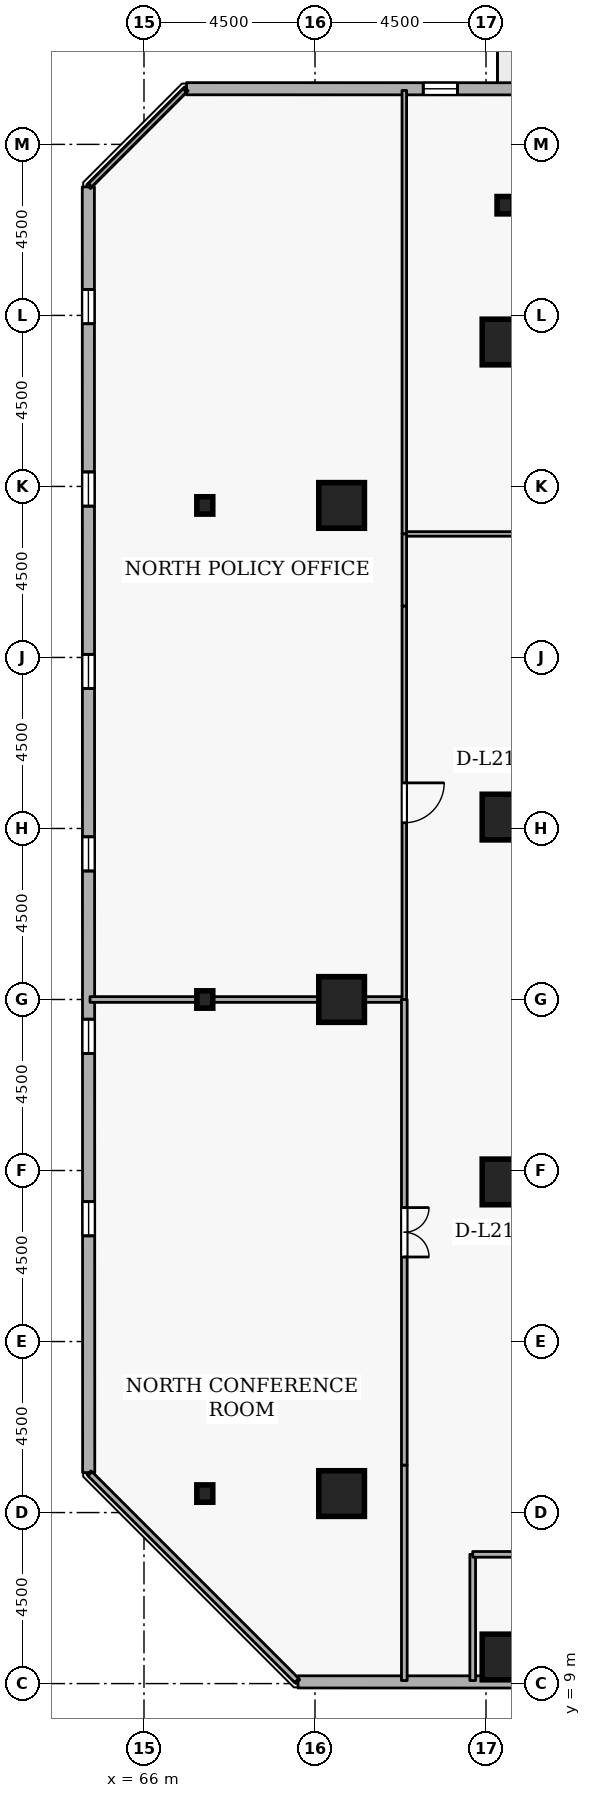
"""IFC4 building model, lengths in metres.
Left out: names, types, materials, properties, quantities, classifications, styles, units other than length and angle.
Written with IfcOpenShell. Run it as: python <this file> out.ifc"""

import sys

from ifc_helpers import new_model, si_unit, direction, frame, frame_2d, origin, origin_2d, place, context, subcontext, project, spatial, rectangle, i_section, extrude, element, fill, save


model = new_model("IFC4")
c1 = context("Model", 3, precision=1e-05, world=origin(), true_north=direction((0.0, 1.0)))
c2 = subcontext(c1, "Body", "Model", "MODEL_VIEW")
j1 = project(units=[si_unit("LENGTHUNIT", "METRE"), si_unit("PLANEANGLEUNIT", "RADIAN")], contexts=[c1])
p1 = place(None, origin())
s1 = spatial("IfcSite", under=j1, at=p1, CompositionType="ELEMENT")
p2 = place(p1, origin())
s2 = spatial("IfcBuilding", under=s1, at=p2, CompositionType="ELEMENT")
p3 = place(p2, frame((0.0, 0.0, 83.7)))
s3 = spatial("IfcBuildingStorey", under=s2, at=p3, CompositionType="ELEMENT", Elevation=83.7)
for number, where, z_axis, x_axis in (
    (1, (75.5, 44.3, 0.0), (0.0, 0.0, 1.0), (1.0, 0.0, 0.0)),
    (2, (71.2, 14.0, 0.0), (0.0, 0.0, 1.0), (1.0, 0.0, 0.0)),
    (3, (71.2, 27.0, 0.0), (0.0, 0.0, 1.0), (1.0, 0.0, 0.0)),
    (4, (71.2, 40.0, 0.0), (0.0, 0.0, 1.0), (1.0, 0.0, 0.0)),
    (5, (75.5, 9.7, 0.0), (0.0, 0.0, 1.0), (1.0, 0.0, 0.0)),
    (6, (75.5, 22.2, 0.0), (0.0, 0.0, 1.0), (1.0, 0.0, 0.0)),
    (7, (75.5, 31.8, 0.0), (0.0, 0.0, 1.0), (1.0, 0.0, 0.0)),
):
    element("IfcColumn", number, at=place(p3, frame(where, z_axis=z_axis, x_axis=x_axis)), inside=s3, PredefinedType="COLUMN", context=c2, shape_type="SweptSolid", body=[
        extrude(rectangle(XDim=1.2, YDim=1.2, at=origin_2d()), origin(), (0.0, 0.0, 1.0), 3.6),
    ])
for number, where, z_axis, x_axis in (
    (8, (75.5, 47.9, 0.0), (0.0, 0.0, 1.0), (1.0, 0.0, 0.0)),
    (9, (67.6, 14.0, 0.0), (0.0, 0.0, 1.0), (1.0, 0.0, 0.0)),
    (10, (67.6, 27.0, 0.0), (0.0, 0.0, 1.0), (1.0, 0.0, 0.0)),
    (11, (67.6, 40.0, 0.0), (0.0, 0.0, 1.0), (1.0, 0.0, 0.0)),
):
    element("IfcColumn", number, at=place(p3, frame(where, z_axis=z_axis, x_axis=x_axis)), inside=s3, PredefinedType="COLUMN", context=c2, shape_type="SweptSolid", body=[
        extrude(i_section(OverallWidth=0.418, OverallDepth=0.456, WebThickness=0.042, FlangeThickness=0.067, FilletRadius=0.015, at=origin_2d()), origin(), (0.0, 0.0, 1.0), 3.6),
    ])
p4 = place(p3, frame((70.052, 9.045, 0.0), z_axis=(0.0, 0.0, 1.0), x_axis=(0.999999960392, -0.000281454314, 0.0)))
e12 = element("IfcWall", 12, at=p4, inside=s3, PredefinedType="STANDARD", context=c2, shape_type="SweptSolid", body=[
    extrude(rectangle(XDim=33.83, YDim=0.32, at=frame_2d((16.915, 0.0))), origin(), (0.0, 0.0, 1.0), 2.7),
])
p5 = place(p4, frame((7.5, 0.0, 0.72)))
e13 = element("IfcOpeningElement", 13, at=p5, cuts=e12, PredefinedType="OPENING", context=c2, shape_type="SweptSolid", body=[
    extrude(rectangle(XDim=0.9, YDim=1.75, at=frame_2d((0.45, 0.875))), frame((0.0, 0.17, 0.0), z_axis=(0.0, -1.0, 0.0), x_axis=(1.0, 0.0, 0.0)), (0.0, 0.0, 1.0), 0.34),
])
p6 = place(p4, frame((12.3, 0.0, 0.72)))
e14 = element("IfcOpeningElement", 14, at=p6, cuts=e12, PredefinedType="OPENING", context=c2, shape_type="SweptSolid", body=[
    extrude(rectangle(XDim=0.9, YDim=1.75, at=frame_2d((0.45, 0.875))), frame((0.0, 0.17, 0.0), z_axis=(0.0, -1.0, 0.0), x_axis=(1.0, 0.0, 0.0)), (0.0, 0.0, 1.0), 0.34),
])
p7 = place(p4, frame((21.9, 0.0, 0.72)))
e15 = element("IfcOpeningElement", 15, at=p7, cuts=e12, PredefinedType="OPENING", context=c2, shape_type="SweptSolid", body=[
    extrude(rectangle(XDim=0.9, YDim=1.75, at=frame_2d((0.45, 0.875))), frame((0.0, 0.17, 0.0), z_axis=(0.0, -1.0, 0.0), x_axis=(1.0, 0.0, 0.0)), (0.0, 0.0, 1.0), 0.34),
])
p8 = place(p4, frame((26.7, 0.0, 0.72)))
e16 = element("IfcOpeningElement", 16, at=p8, cuts=e12, PredefinedType="OPENING", context=c2, shape_type="SweptSolid", body=[
    extrude(rectangle(XDim=0.9, YDim=1.75, at=frame_2d((0.45, 0.875))), frame((0.0, 0.17, 0.0), z_axis=(0.0, -1.0, 0.0), x_axis=(1.0, 0.0, 0.0)), (0.0, 0.0, 1.0), 0.34),
])
p9 = place(p3, frame((100.948, 50.955, 0.0), z_axis=(0.0, 0.0, 1.0), x_axis=(-0.999999960392, 0.000281454314, 0.0)))
e17 = element("IfcWall", 17, at=p9, inside=s3, PredefinedType="STANDARD", context=c2, shape_type="SweptSolid", body=[
    extrude(rectangle(XDim=33.83, YDim=0.32, at=frame_2d((16.915, 0.0))), origin(), (0.0, 0.0, 1.0), 2.7),
])
p10 = place(p9, frame((18.715, 0.0, 0.0)))
e18 = element("IfcOpeningElement", 18, at=p10, cuts=e17, PredefinedType="OPENING", context=c2, shape_type="SweptSolid", body=[
    extrude(rectangle(XDim=1.0, YDim=2.08, at=frame_2d((0.5, 1.04))), frame((0.0, 0.17, 0.0), z_axis=(0.0, -1.0, 0.0), x_axis=(1.0, 0.0, 0.0)), (0.0, 0.0, 1.0), 0.34),
])
p11 = place(p9, frame((2.7, 0.0, 0.72)))
e19 = element("IfcOpeningElement", 19, at=p11, cuts=e17, PredefinedType="OPENING", context=c2, shape_type="SweptSolid", body=[
    extrude(rectangle(XDim=0.9, YDim=1.75, at=frame_2d((0.45, 0.875))), frame((0.0, 0.17, 0.0), z_axis=(0.0, -1.0, 0.0), x_axis=(1.0, 0.0, 0.0)), (0.0, 0.0, 1.0), 0.34),
])
p12 = place(p9, frame((7.5, 0.0, 0.72)))
e20 = element("IfcOpeningElement", 20, at=p12, cuts=e17, PredefinedType="OPENING", context=c2, shape_type="SweptSolid", body=[
    extrude(rectangle(XDim=0.9, YDim=1.75, at=frame_2d((0.45, 0.875))), frame((0.0, 0.17, 0.0), z_axis=(0.0, -1.0, 0.0), x_axis=(1.0, 0.0, 0.0)), (0.0, 0.0, 1.0), 0.34),
])
p13 = place(p9, frame((21.9, 0.0, 0.72)))
e21 = element("IfcOpeningElement", 21, at=p13, cuts=e17, PredefinedType="OPENING", context=c2, shape_type="SweptSolid", body=[
    extrude(rectangle(XDim=0.9, YDim=1.75, at=frame_2d((0.45, 0.875))), frame((0.0, 0.17, 0.0), z_axis=(0.0, -1.0, 0.0), x_axis=(1.0, 0.0, 0.0)), (0.0, 0.0, 1.0), 0.34),
])
p14 = place(p9, frame((26.7, 0.0, 0.72)))
e22 = element("IfcOpeningElement", 22, at=p14, cuts=e17, PredefinedType="OPENING", context=c2, shape_type="SweptSolid", body=[
    extrude(rectangle(XDim=0.9, YDim=1.75, at=frame_2d((0.45, 0.875))), frame((0.0, 0.17, 0.0), z_axis=(0.0, -1.0, 0.0), x_axis=(1.0, 0.0, 0.0)), (0.0, 0.0, 1.0), 0.34),
])
p15 = place(p3, frame((64.535, 48.381, 0.0), z_axis=(0.0, 0.0, 1.0), x_axis=(0.000281454314, -0.999999960392, 0.0)))
e23 = element("IfcWall", 23, at=p15, inside=s3, PredefinedType="STANDARD", context=c2, shape_type="SweptSolid", body=[
    extrude(rectangle(XDim=33.83, YDim=0.32, at=frame_2d((16.915, 0.0))), origin(), (0.0, 0.0, 1.0), 2.7),
])
p16 = place(p15, frame((2.7, 0.0, 0.72)))
e24 = element("IfcOpeningElement", 24, at=p16, cuts=e23, PredefinedType="OPENING", context=c2, shape_type="SweptSolid", body=[
    extrude(rectangle(XDim=0.9, YDim=1.75, at=frame_2d((0.45, 0.875))), frame((0.0, 0.17, 0.0), z_axis=(0.0, -1.0, 0.0), x_axis=(1.0, 0.0, 0.0)), (0.0, 0.0, 1.0), 0.34),
])
p17 = place(p15, frame((7.5, 0.0, 0.72)))
e25 = element("IfcOpeningElement", 25, at=p17, cuts=e23, PredefinedType="OPENING", context=c2, shape_type="SweptSolid", body=[
    extrude(rectangle(XDim=0.9, YDim=1.75, at=frame_2d((0.45, 0.875))), frame((0.0, 0.17, 0.0), z_axis=(0.0, -1.0, 0.0), x_axis=(1.0, 0.0, 0.0)), (0.0, 0.0, 1.0), 0.34),
])
p18 = place(p15, frame((12.3, 0.0, 0.72)))
e26 = element("IfcOpeningElement", 26, at=p18, cuts=e23, PredefinedType="OPENING", context=c2, shape_type="SweptSolid", body=[
    extrude(rectangle(XDim=0.9, YDim=1.75, at=frame_2d((0.45, 0.875))), frame((0.0, 0.17, 0.0), z_axis=(0.0, -1.0, 0.0), x_axis=(1.0, 0.0, 0.0)), (0.0, 0.0, 1.0), 0.34),
])
p19 = place(p15, frame((17.1, 0.0, 0.72)))
e27 = element("IfcOpeningElement", 27, at=p19, cuts=e23, PredefinedType="OPENING", context=c2, shape_type="SweptSolid", body=[
    extrude(rectangle(XDim=0.9, YDim=1.75, at=frame_2d((0.45, 0.875))), frame((0.0, 0.17, 0.0), z_axis=(0.0, -1.0, 0.0), x_axis=(1.0, 0.0, 0.0)), (0.0, 0.0, 1.0), 0.34),
])
p20 = place(p15, frame((21.9, 0.0, 0.72)))
e28 = element("IfcOpeningElement", 28, at=p20, cuts=e23, PredefinedType="OPENING", context=c2, shape_type="SweptSolid", body=[
    extrude(rectangle(XDim=0.9, YDim=1.75, at=frame_2d((0.45, 0.875))), frame((0.0, 0.17, 0.0), z_axis=(0.0, -1.0, 0.0), x_axis=(1.0, 0.0, 0.0)), (0.0, 0.0, 1.0), 0.34),
])
p21 = place(p15, frame((26.7, 0.0, 0.72)))
e29 = element("IfcOpeningElement", 29, at=p21, cuts=e23, PredefinedType="OPENING", context=c2, shape_type="SweptSolid", body=[
    extrude(rectangle(XDim=0.9, YDim=1.75, at=frame_2d((0.45, 0.875))), frame((0.0, 0.17, 0.0), z_axis=(0.0, -1.0, 0.0), x_axis=(1.0, 0.0, 0.0)), (0.0, 0.0, 1.0), 0.34),
])
p22 = place(p3, frame((74.65, 9.08, 0.0), z_axis=(0.0, 0.0, 1.0), x_axis=(0.0, 1.0, 0.0)))
e30 = element("IfcWall", 30, at=p22, inside=s3, PredefinedType="PARTITIONING", context=c2, shape_type="SweptSolid", body=[
    extrude(rectangle(XDim=3.32, YDim=0.15, at=frame_2d((1.66, 0.0))), origin(), (0.0, 0.0, 1.0), 3.34),
])
p23 = place(p3, frame((74.65, 12.4, 0.0), z_axis=(0.0, 0.0, 1.0), x_axis=(1.0, 0.0, 0.0)))
e31 = element("IfcWall", 31, at=p23, inside=s3, PredefinedType="PARTITIONING", context=c2, shape_type="SweptSolid", body=[
    extrude(rectangle(XDim=4.802, YDim=0.15, at=frame_2d((2.401, 0.0))), origin(), (0.0, 0.0, 1.0), 3.34),
])
p24 = place(p3, frame((82.2, 39.25, 0.0), z_axis=(0.0, 0.0, 1.0), x_axis=(-1.0, 0.0, 0.0)))
e32 = element("IfcWall", 32, at=p24, inside=s3, PredefinedType="PARTITIONING", context=c2, shape_type="SweptSolid", body=[
    extrude(rectangle(XDim=9.35, YDim=0.12, at=frame_2d((4.675, 0.0))), origin(), (0.0, 0.0, 1.0), 3.34),
])
p25 = place(p24, frame((4.15, 0.0, 0.0)))
e33 = element("IfcOpeningElement", 33, at=p25, cuts=e32, PredefinedType="OPENING", context=c2, shape_type="SweptSolid", body=[
    extrude(rectangle(XDim=1.05, YDim=2.1, at=frame_2d((0.525, 1.05))), frame((0.0, 0.07, 0.0), z_axis=(0.0, -1.0, 0.0), x_axis=(1.0, 0.0, 0.0)), (0.0, 0.0, 1.0), 0.14),
])
p26 = place(p3, frame((72.85, 39.25, 0.0), z_axis=(0.0, 0.0, 1.0), x_axis=(0.0, 1.0, 0.0)))
e34 = element("IfcWall", 34, at=p26, inside=s3, PredefinedType="PARTITIONING", context=c2, shape_type="SweptSolid", body=[
    extrude(rectangle(XDim=11.67, YDim=0.12, at=frame_2d((5.835, 0.0))), origin(), (0.0, 0.0, 1.0), 3.34),
])
p27 = place(p3, frame((72.85, 14.75, 0.0), z_axis=(0.0, 0.0, 1.0), x_axis=(0.0, -1.0, 0.0)))
e35 = element("IfcWall", 35, at=p27, inside=s3, PredefinedType="PARTITIONING", context=c2, shape_type="SweptSolid", body=[
    extrude(rectangle(XDim=5.67, YDim=0.15, at=frame_2d((2.835, 0.0))), origin(), (0.0, 0.0, 1.0), 3.34),
])
p28 = place(p3, frame((70.02, 9.08, 0.0), z_axis=(0.0, 0.0, 1.0), x_axis=(-0.707106781187, 0.707106781187, 0.0)))
e36 = element("IfcWall", 36, at=p28, inside=s3, PredefinedType="PARTITIONING", context=c2, shape_type="SweptSolid", body=[
    extrude(rectangle(XDim=7.693, YDim=0.15, at=frame_2d((3.846, 0.0))), origin(), (0.0, 0.0, 1.0), 3.34),
])
p29 = place(p3, frame((64.58, 27.0, 0.0), z_axis=(0.0, 0.0, 1.0), x_axis=(1.0, 0.0, 0.0)))
e37 = element("IfcWall", 37, at=p29, inside=s3, PredefinedType="PARTITIONING", context=c2, shape_type="SweptSolid", body=[
    extrude(rectangle(XDim=8.27, YDim=0.15, at=frame_2d((4.135, 0.0))), origin(), (0.0, 0.0, 1.0), 2.882),
])
p30 = place(p3, frame((72.85, 27.0, 0.0), z_axis=(0.0, 0.0, 1.0), x_axis=(0.0, -1.0, 0.0)))
e38 = element("IfcWall", 38, at=p30, inside=s3, PredefinedType="PARTITIONING", context=c2, shape_type="SweptSolid", body=[
    extrude(rectangle(XDim=12.25, YDim=0.15, at=frame_2d((6.125, 0.0))), origin(), (0.0, 0.0, 1.0), 3.34),
])
p31 = place(p30, frame((5.475, 0.0, 0.0)))
e39 = element("IfcOpeningElement", 39, at=p31, cuts=e38, PredefinedType="OPENING", context=c2, shape_type="SweptSolid", body=[
    extrude(rectangle(XDim=1.3, YDim=2.12, at=frame_2d((0.65, 1.06))), frame((0.0, 0.085, 0.0), z_axis=(0.0, -1.0, 0.0), x_axis=(1.0, 0.0, 0.0)), (0.0, 0.0, 1.0), 0.17),
])
p32 = place(p3, frame((64.58, 48.425, 0.0), z_axis=(0.0, 0.0, 1.0), x_axis=(0.707106781187, 0.707106781187, 0.0)))
e40 = element("IfcWall", 40, at=p32, inside=s3, PredefinedType="PARTITIONING", context=c2, shape_type="SweptSolid", body=[
    extrude(rectangle(XDim=3.528, YDim=0.12, at=frame_2d((1.764, 0.0))), origin(), (0.0, 0.0, 1.0), 3.34),
])
p33 = place(p3, frame((72.85, 39.25, 0.0), z_axis=(0.0, 0.0, 1.0), x_axis=(0.0, -1.0, 0.0)))
e41 = element("IfcWall", 41, at=p33, inside=s3, PredefinedType="PARTITIONING", context=c2, shape_type="SweptSolid", body=[
    extrude(rectangle(XDim=1.9, YDim=0.12, at=frame_2d((0.95, 0.0))), origin(), (0.0, 0.0, 1.0), 2.895),
])
p34 = place(p3, frame((72.85, 37.35, 0.0), z_axis=(0.0, 0.0, 1.0), x_axis=(0.0, -1.0, 0.0)))
e42 = element("IfcWall", 42, at=p34, inside=s3, PredefinedType="PARTITIONING", context=c2, shape_type="SweptSolid", body=[
    extrude(rectangle(XDim=10.35, YDim=0.12, at=frame_2d((5.175, 0.0))), origin(), (0.0, 0.0, 1.0), 2.895),
])
p35 = place(p34, frame((4.65, 0.0, 0.0)))
e43 = element("IfcOpeningElement", 43, at=p35, cuts=e42, PredefinedType="OPENING", context=c2, shape_type="SweptSolid", body=[
    extrude(rectangle(XDim=1.05, YDim=2.1, at=frame_2d((0.525, 1.05))), frame((0.0, 0.07, 0.0), z_axis=(0.0, -1.0, 0.0), x_axis=(1.0, 0.0, 0.0)), (0.0, 0.0, 1.0), 0.14),
])
p36 = place(p14, origin())
e44 = element("IfcWindow", 44, at=p36, inside=s3, PartitioningType="SINGLE_PANEL", PredefinedType="WINDOW", context=c2, shape_type="SweptSolid", body=[
    extrude(rectangle(XDim=0.9, YDim=1.75, at=frame_2d((0.45, 0.875))), frame((0.0, 0.03, 0.0), z_axis=(0.0, -1.0, 0.0), x_axis=(1.0, 0.0, 0.0)), (0.0, 0.0, 1.0), 0.06),
])
fill(e22, e44)
p37 = place(p16, origin())
e45 = element("IfcWindow", 45, at=p37, inside=s3, PartitioningType="SINGLE_PANEL", PredefinedType="WINDOW", context=c2, shape_type="SweptSolid", body=[
    extrude(rectangle(XDim=0.9, YDim=1.75, at=frame_2d((0.45, 0.875))), frame((0.0, 0.03, 0.0), z_axis=(0.0, -1.0, 0.0), x_axis=(1.0, 0.0, 0.0)), (0.0, 0.0, 1.0), 0.06),
])
fill(e24, e45)
p38 = place(p17, origin())
e46 = element("IfcWindow", 46, at=p38, inside=s3, PartitioningType="SINGLE_PANEL", PredefinedType="WINDOW", context=c2, shape_type="SweptSolid", body=[
    extrude(rectangle(XDim=0.9, YDim=1.75, at=frame_2d((0.45, 0.875))), frame((0.0, 0.03, 0.0), z_axis=(0.0, -1.0, 0.0), x_axis=(1.0, 0.0, 0.0)), (0.0, 0.0, 1.0), 0.06),
])
fill(e25, e46)
p39 = place(p18, origin())
e47 = element("IfcWindow", 47, at=p39, inside=s3, PartitioningType="SINGLE_PANEL", PredefinedType="WINDOW", context=c2, shape_type="SweptSolid", body=[
    extrude(rectangle(XDim=0.9, YDim=1.75, at=frame_2d((0.45, 0.875))), frame((0.0, 0.03, 0.0), z_axis=(0.0, -1.0, 0.0), x_axis=(1.0, 0.0, 0.0)), (0.0, 0.0, 1.0), 0.06),
])
fill(e26, e47)
p40 = place(p19, origin())
e48 = element("IfcWindow", 48, at=p40, inside=s3, PartitioningType="SINGLE_PANEL", PredefinedType="WINDOW", context=c2, shape_type="SweptSolid", body=[
    extrude(rectangle(XDim=0.9, YDim=1.75, at=frame_2d((0.45, 0.875))), frame((0.0, 0.03, 0.0), z_axis=(0.0, -1.0, 0.0), x_axis=(1.0, 0.0, 0.0)), (0.0, 0.0, 1.0), 0.06),
])
fill(e27, e48)
p41 = place(p20, origin())
e49 = element("IfcWindow", 49, at=p41, inside=s3, PartitioningType="SINGLE_PANEL", PredefinedType="WINDOW", context=c2, shape_type="SweptSolid", body=[
    extrude(rectangle(XDim=0.9, YDim=1.75, at=frame_2d((0.45, 0.875))), frame((0.0, 0.03, 0.0), z_axis=(0.0, -1.0, 0.0), x_axis=(1.0, 0.0, 0.0)), (0.0, 0.0, 1.0), 0.06),
])
fill(e28, e49)
p42 = place(p21, origin())
e50 = element("IfcWindow", 50, at=p42, inside=s3, PartitioningType="SINGLE_PANEL", PredefinedType="WINDOW", context=c2, shape_type="SweptSolid", body=[
    extrude(rectangle(XDim=0.9, YDim=1.75, at=frame_2d((0.45, 0.875))), frame((0.0, 0.03, 0.0), z_axis=(0.0, -1.0, 0.0), x_axis=(1.0, 0.0, 0.0)), (0.0, 0.0, 1.0), 0.06),
])
fill(e29, e50)
p43 = place(p31, origin())
e51 = element("IfcDoor", 51, at=p43, inside=s3, OperationType="DOUBLE_DOOR_SINGLE_SWING", PredefinedType="DOOR", context=c2, shape_type="SweptSolid", body=[
    extrude(rectangle(XDim=1.3, YDim=2.12, at=frame_2d((0.65, 1.06))), frame((0.0, 0.025, 0.0), z_axis=(0.0, -1.0, 0.0), x_axis=(1.0, 0.0, 0.0)), (0.0, 0.0, 1.0), 0.05),
])
fill(e39, e51)
p44 = place(p35, origin())
e52 = element("IfcDoor", 52, at=p44, inside=s3, OperationType="SINGLE_SWING_LEFT", PredefinedType="DOOR", context=c2, shape_type="SweptSolid", body=[
    extrude(rectangle(XDim=1.05, YDim=2.1, at=frame_2d((0.525, 1.05))), frame((0.0, 0.025, 0.0), z_axis=(0.0, -1.0, 0.0), x_axis=(1.0, 0.0, 0.0)), (0.0, 0.0, 1.0), 0.05),
])
fill(e43, e52)
save(model, sys.argv[1])
